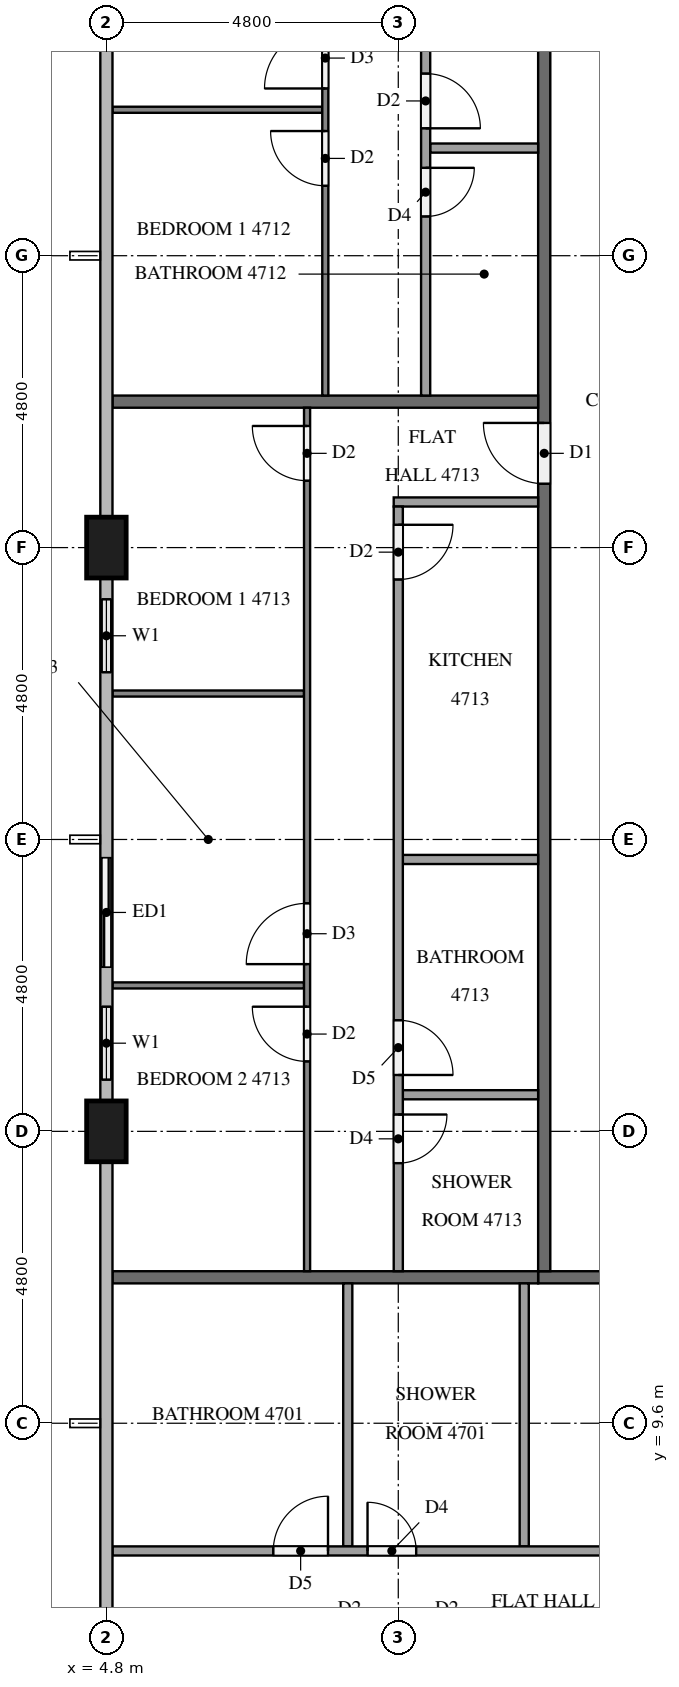
"""IFC4 building model, lengths in metres.
Left out: names, types, materials, properties, quantities, classifications, styles, units other than length and angle.
Written with IfcOpenShell. Run it as: python <this file> out.ifc"""

import sys

from ifc_helpers import new_model, si_unit, direction, frame, frame_2d, origin, origin_2d, place, context, subcontext, project, spatial, rectangle, extrude, element, fill, save


model = new_model("IFC4")
c1 = context("Model", 3, precision=1e-05, world=origin(), true_north=direction((0.0, 1.0)))
c2 = subcontext(c1, "Body", "Model", "MODEL_VIEW")
j1 = project(units=[si_unit("LENGTHUNIT", "METRE"), si_unit("PLANEANGLEUNIT", "RADIAN")], contexts=[c1])
p1 = place(None, origin())
s1 = spatial("IfcSite", under=j1, at=p1, CompositionType="ELEMENT")
p2 = place(p1, origin())
s2 = spatial("IfcBuilding", under=s1, at=p2, CompositionType="ELEMENT")
p3 = place(p2, frame((0.0, 0.0, 182.4)))
s3 = spatial("IfcBuildingStorey", under=s2, at=p3, CompositionType="ELEMENT", Elevation=182.4)
for number, where, z_axis, x_axis in (
    (1, (4.8, 24.0, 0.0), (0.0, 0.0, 1.0), (0.0, 1.0, 0.0)),
    (2, (4.8, 14.4, 0.0), (0.0, 0.0, 1.0), (0.0, 1.0, 0.0)),
):
    element("IfcColumn", number, at=place(p3, frame(where, z_axis=z_axis, x_axis=x_axis)), inside=s3, PredefinedType="COLUMN", context=c2, shape_type="SweptSolid", body=[
        extrude(rectangle(XDim=1.0, YDim=0.65, at=origin_2d()), origin(), (0.0, 0.0, 1.0), 3.2),
    ])
p4 = place(p3, frame((4.8, 23.5, 0.0), z_axis=(0.0, 0.0, 1.0), x_axis=(0.0, -1.0, 0.0)))
e3 = element("IfcWall", 3, at=p4, inside=s3, PredefinedType="SOLIDWALL", context=c2, shape_type="SweptSolid", body=[
    extrude(rectangle(XDim=1.9, YDim=0.15, at=frame_2d((0.95, 0.0))), origin(), (0.0, 0.0, 1.0), 3.2),
])
p5 = place(p4, frame((0.35, 0.0, 0.9)))
e4 = element("IfcOpeningElement", 4, at=p5, cuts=e3, PredefinedType="OPENING", context=c2, shape_type="SweptSolid", body=[
    extrude(rectangle(XDim=1.2, YDim=1.4, at=frame_2d((0.6, 0.7))), frame((0.0, 0.085, 0.0), z_axis=(0.0, -1.0, 0.0), x_axis=(1.0, 0.0, 0.0)), (0.0, 0.0, 1.0), 0.17),
])
p6 = place(p3, frame((4.8, 19.2, 0.0), z_axis=(0.0, 0.0, 1.0), x_axis=(0.0, -1.0, 0.0)))
e5 = element("IfcWall", 5, at=p6, inside=s3, PredefinedType="SOLIDWALL", context=c2, shape_type="SweptSolid", body=[
    extrude(rectangle(XDim=4.3, YDim=0.15, at=frame_2d((2.15, 0.0))), origin(), (0.0, 0.0, 1.0), 3.2),
])
p7 = place(p6, frame((0.3, 0.0, 0.0)))
e6 = element("IfcOpeningElement", 6, at=p7, cuts=e5, PredefinedType="OPENING", context=c2, shape_type="SweptSolid", body=[
    extrude(rectangle(XDim=1.8, YDim=2.4, at=frame_2d((0.9, 1.2))), frame((0.0, 0.085, 0.0), z_axis=(0.0, -1.0, 0.0), x_axis=(1.0, 0.0, 0.0)), (0.0, 0.0, 1.0), 0.17),
])
p8 = place(p6, frame((2.75, 0.0, 0.9)))
e7 = element("IfcOpeningElement", 7, at=p8, cuts=e5, PredefinedType="OPENING", context=c2, shape_type="SweptSolid", body=[
    extrude(rectangle(XDim=1.2, YDim=1.4, at=frame_2d((0.6, 0.7))), frame((0.0, 0.085, 0.0), z_axis=(0.0, -1.0, 0.0), x_axis=(1.0, 0.0, 0.0)), (0.0, 0.0, 1.0), 0.17),
])
p9 = place(p3, frame((50.5, 12.0, 0.0), z_axis=(0.0, 0.0, 1.0), x_axis=(-1.0, 0.0, 0.0)))
e8 = element("IfcWall", 8, at=p9, inside=s3, PredefinedType="PARTITIONING", context=c2, shape_type="SweptSolid", body=[
    extrude(rectangle(XDim=38.6, YDim=0.2, at=frame_2d((19.3, 0.0))), origin(), (0.0, 0.0, 1.0), 3.2),
])
p10 = place(p9, frame((31.65, 0.0, 0.0)))
e9 = element("IfcOpeningElement", 9, at=p10, cuts=e8, PredefinedType="OPENING", context=c2, shape_type="SweptSolid", body=[
    extrude(rectangle(XDim=1.0, YDim=2.1, at=frame_2d((0.5, 1.05))), frame((0.0, 0.11, 0.0), z_axis=(0.0, -1.0, 0.0), x_axis=(1.0, 0.0, 0.0)), (0.0, 0.0, 1.0), 0.22),
])
p11 = place(p9, frame((17.25, 0.0, 0.0)))
e10 = element("IfcOpeningElement", 10, at=p11, cuts=e8, PredefinedType="OPENING", context=c2, shape_type="SweptSolid", body=[
    extrude(rectangle(XDim=1.0, YDim=2.1, at=frame_2d((0.5, 1.05))), frame((0.0, 0.11, 0.0), z_axis=(0.0, -1.0, 0.0), x_axis=(1.0, 0.0, 0.0)), (0.0, 0.0, 1.0), 0.22),
])
p12 = place(p9, frame((7.65, 0.0, 0.0)))
e11 = element("IfcOpeningElement", 11, at=p12, cuts=e8, PredefinedType="OPENING", context=c2, shape_type="SweptSolid", body=[
    extrude(rectangle(XDim=1.0, YDim=2.1, at=frame_2d((0.5, 1.05))), frame((0.0, 0.11, 0.0), z_axis=(0.0, -1.0, 0.0), x_axis=(1.0, 0.0, 0.0)), (0.0, 0.0, 1.0), 0.22),
])
p13 = place(p9, frame((5.9, 0.0, 0.0)))
e12 = element("IfcOpeningElement", 12, at=p13, cuts=e8, PredefinedType="OPENING", context=c2, shape_type="SweptSolid", body=[
    extrude(rectangle(XDim=1.1, YDim=2.1, at=frame_2d((0.55, 1.05))), frame((0.0, 0.11, 0.0), z_axis=(0.0, -1.0, 0.0), x_axis=(1.0, 0.0, 0.0)), (0.0, 0.0, 1.0), 0.22),
])
p14 = place(p3, frame((12.0, 12.1, 0.0), z_axis=(0.0, 0.0, 1.0), x_axis=(0.0, 1.0, 0.0)))
e13 = element("IfcWall", 13, at=p14, inside=s3, PredefinedType="PARTITIONING", context=c2, shape_type="SweptSolid", body=[
    extrude(rectangle(XDim=28.6, YDim=0.2, at=frame_2d((14.3, 0.0))), origin(), (0.0, 0.0, 1.0), 3.2),
])
p15 = place(p14, frame((26.65, 0.0, 0.0)))
e14 = element("IfcOpeningElement", 14, at=p15, cuts=e13, PredefinedType="OPENING", context=c2, shape_type="SweptSolid", body=[
    extrude(rectangle(XDim=1.0, YDim=2.1, at=frame_2d((0.5, 1.05))), frame((0.0, 0.11, 0.0), z_axis=(0.0, -1.0, 0.0), x_axis=(1.0, 0.0, 0.0)), (0.0, 0.0, 1.0), 0.22),
])
p16 = place(p14, frame((24.95, 0.0, 0.0)))
e15 = element("IfcOpeningElement", 15, at=p16, cuts=e13, PredefinedType="OPENING", context=c2, shape_type="SweptSolid", body=[
    extrude(rectangle(XDim=1.0, YDim=2.1, at=frame_2d((0.5, 1.05))), frame((0.0, 0.11, 0.0), z_axis=(0.0, -1.0, 0.0), x_axis=(1.0, 0.0, 0.0)), (0.0, 0.0, 1.0), 0.22),
])
p17 = place(p14, frame((12.95, 0.0, 0.0)))
e16 = element("IfcOpeningElement", 16, at=p17, cuts=e13, PredefinedType="OPENING", context=c2, shape_type="SweptSolid", body=[
    extrude(rectangle(XDim=1.0, YDim=2.1, at=frame_2d((0.5, 1.05))), frame((0.0, 0.11, 0.0), z_axis=(0.0, -1.0, 0.0), x_axis=(1.0, 0.0, 0.0)), (0.0, 0.0, 1.0), 0.22),
])
for number, where, z_axis, x_axis in (
    (17, (4.9, 12.0, 0.0), (0.0, 0.0, 1.0), (1.0, 0.0, 0.0)),
    (18, (4.9, 26.4, 0.0), (0.0, 0.0, 1.0), (1.0, 0.0, 0.0)),
):
    element("IfcWall", number, at=place(p3, frame(where, z_axis=z_axis, x_axis=x_axis)), inside=s3, PredefinedType="PARTITIONING", context=c2, shape_type="SweptSolid", body=[
        extrude(rectangle(XDim=7.0, YDim=0.2, at=frame_2d((3.5, 0.0))), origin(), (0.0, 0.0, 1.0), 3.2),
    ])
for number, where, z_axis, x_axis in (
    (19, (11.671, 11.9, 0.0), (0.0, 0.0, 1.0), (0.0, -1.0, 0.0)),
    (20, (8.769, 11.9, 0.0), (0.0, 0.0, 1.0), (0.0, -1.0, 0.0)),
):
    element("IfcWall", number, at=place(p3, frame(where, z_axis=z_axis, x_axis=x_axis)), inside=s3, PredefinedType="PARTITIONING", context=c2, shape_type="SweptSolid", body=[
        extrude(rectangle(XDim=4.325, YDim=0.15, at=frame_2d((2.163, 0.0))), origin(), (0.0, 0.0, 1.0), 3.2),
    ])
p18 = place(p3, frame((4.9, 7.5, 0.0), z_axis=(0.0, 0.0, 1.0), x_axis=(1.0, 0.0, 0.0)))
e21 = element("IfcWall", 21, at=p18, inside=s3, PredefinedType="PARTITIONING", context=c2, shape_type="SweptSolid", body=[
    extrude(rectangle(XDim=12.575, YDim=0.15, at=frame_2d((6.288, 0.0))), origin(), (0.0, 0.0, 1.0), 3.2),
])
p19 = place(p18, frame((11.375, 0.0, 0.0)))
e22 = element("IfcOpeningElement", 22, at=p19, cuts=e21, PredefinedType="OPENING", context=c2, shape_type="SweptSolid", body=[
    extrude(rectangle(XDim=0.9, YDim=2.1, at=frame_2d((0.45, 1.05))), frame((0.0, 0.085, 0.0), z_axis=(0.0, -1.0, 0.0), x_axis=(1.0, 0.0, 0.0)), (0.0, 0.0, 1.0), 0.17),
])
p20 = place(p18, frame((4.194, 0.0, 0.0)))
e23 = element("IfcOpeningElement", 23, at=p20, cuts=e21, PredefinedType="OPENING", context=c2, shape_type="SweptSolid", body=[
    extrude(rectangle(XDim=0.8, YDim=2.1, at=frame_2d((0.4, 1.05))), frame((0.0, 0.085, 0.0), z_axis=(0.0, -1.0, 0.0), x_axis=(1.0, 0.0, 0.0)), (0.0, 0.0, 1.0), 0.17),
])
p21 = place(p18, frame((2.644, 0.0, 0.0)))
e24 = element("IfcOpeningElement", 24, at=p21, cuts=e21, PredefinedType="OPENING", context=c2, shape_type="SweptSolid", body=[
    extrude(rectangle(XDim=0.9, YDim=2.1, at=frame_2d((0.45, 1.05))), frame((0.0, 0.085, 0.0), z_axis=(0.0, -1.0, 0.0), x_axis=(1.0, 0.0, 0.0)), (0.0, 0.0, 1.0), 0.17),
])
p22 = place(p3, frame((8.35, 31.2, 0.0), z_axis=(0.0, 0.0, 1.0), x_axis=(-1.0, 0.0, 0.0)))
e25 = element("IfcWall", 25, at=p22, inside=s3, PredefinedType="PARTITIONING", context=c2, shape_type="SweptSolid", body=[
    extrude(rectangle(XDim=3.45, YDim=0.1, at=frame_2d((1.725, 0.0))), origin(), (0.0, 0.0, 1.0), 3.2),
])
p23 = place(p3, frame((8.4, 26.5, 0.0), z_axis=(0.0, 0.0, 1.0), x_axis=(0.0, 1.0, 0.0)))
e26 = element("IfcWall", 26, at=p23, inside=s3, PredefinedType="PARTITIONING", context=c2, shape_type="SweptSolid", body=[
    extrude(rectangle(XDim=11.8, YDim=0.1, at=frame_2d((5.9, 0.0))), origin(), (0.0, 0.0, 1.0), 3.2),
])
p24 = place(p23, frame((5.05, 0.0, 0.0)))
e27 = element("IfcOpeningElement", 27, at=p24, cuts=e26, PredefinedType="OPENING", context=c2, shape_type="SweptSolid", body=[
    extrude(rectangle(XDim=1.0, YDim=2.1, at=frame_2d((0.5, 1.05))), frame((0.0, 0.06, 0.0), z_axis=(0.0, -1.0, 0.0), x_axis=(1.0, 0.0, 0.0)), (0.0, 0.0, 1.0), 0.12),
])
p25 = place(p23, frame((3.45, 0.0, 0.0)))
e28 = element("IfcOpeningElement", 28, at=p25, cuts=e26, PredefinedType="OPENING", context=c2, shape_type="SweptSolid", body=[
    extrude(rectangle(XDim=0.9, YDim=2.1, at=frame_2d((0.45, 1.05))), frame((0.0, 0.06, 0.0), z_axis=(0.0, -1.0, 0.0), x_axis=(1.0, 0.0, 0.0)), (0.0, 0.0, 1.0), 0.12),
])
p26 = place(p3, frame((11.9, 30.57, 0.0), z_axis=(0.0, 0.0, 1.0), x_axis=(-1.0, 0.0, 0.0)))
e29 = element("IfcWall", 29, at=p26, inside=s3, PredefinedType="PARTITIONING", context=c2, shape_type="SweptSolid", body=[
    extrude(rectangle(XDim=1.775, YDim=0.15, at=frame_2d((0.887, 0.0))), origin(), (0.0, 0.0, 1.0), 3.2),
])
p27 = place(p3, frame((10.05, 36.675, 0.0), z_axis=(0.0, 0.0, 1.0), x_axis=(0.0, -1.0, 0.0)))
e30 = element("IfcWall", 30, at=p27, inside=s3, PredefinedType="PARTITIONING", context=c2, shape_type="SweptSolid", body=[
    extrude(rectangle(XDim=10.175, YDim=0.15, at=frame_2d((5.087, 0.0))), origin(), (0.0, 0.0, 1.0), 3.2),
])
p28 = place(p27, frame((4.88, 0.0, 0.0)))
e31 = element("IfcOpeningElement", 31, at=p28, cuts=e30, PredefinedType="OPENING", context=c2, shape_type="SweptSolid", body=[
    extrude(rectangle(XDim=0.9, YDim=2.1, at=frame_2d((0.45, 1.05))), frame((0.0, 0.085, 0.0), z_axis=(0.0, -1.0, 0.0), x_axis=(1.0, 0.0, 0.0)), (0.0, 0.0, 1.0), 0.17),
])
p29 = place(p27, frame((6.43, 0.0, 0.0)))
e32 = element("IfcOpeningElement", 32, at=p29, cuts=e30, PredefinedType="OPENING", context=c2, shape_type="SweptSolid", body=[
    extrude(rectangle(XDim=0.8, YDim=2.1, at=frame_2d((0.4, 1.05))), frame((0.0, 0.085, 0.0), z_axis=(0.0, -1.0, 0.0), x_axis=(1.0, 0.0, 0.0)), (0.0, 0.0, 1.0), 0.17),
])
for number, where, z_axis, x_axis in (
    (33, (8.05, 21.6, 0.0), (0.0, 0.0, 1.0), (-1.0, 0.0, 0.0)),
    (34, (8.05, 16.8, 0.0), (0.0, 0.0, 1.0), (-1.0, 0.0, 0.0)),
):
    element("IfcWall", number, at=place(p3, frame(where, z_axis=z_axis, x_axis=x_axis)), inside=s3, PredefinedType="PARTITIONING", context=c2, shape_type="SweptSolid", body=[
        extrude(rectangle(XDim=3.15, YDim=0.1, at=frame_2d((1.575, 0.0))), origin(), (0.0, 0.0, 1.0), 3.2),
    ])
p30 = place(p3, frame((8.1, 12.1, 0.0), z_axis=(0.0, 0.0, 1.0), x_axis=(0.0, 1.0, 0.0)))
e35 = element("IfcWall", 35, at=p30, inside=s3, PredefinedType="PARTITIONING", context=c2, shape_type="SweptSolid", body=[
    extrude(rectangle(XDim=14.2, YDim=0.1, at=frame_2d((7.1, 0.0))), origin(), (0.0, 0.0, 1.0), 3.2),
])
p31 = place(p30, frame((13.0, 0.0, 0.0)))
e36 = element("IfcOpeningElement", 36, at=p31, cuts=e35, PredefinedType="OPENING", context=c2, shape_type="SweptSolid", body=[
    extrude(rectangle(XDim=0.9, YDim=2.1, at=frame_2d((0.45, 1.05))), frame((0.0, 0.06, 0.0), z_axis=(0.0, -1.0, 0.0), x_axis=(1.0, 0.0, 0.0)), (0.0, 0.0, 1.0), 0.12),
])
p32 = place(p30, frame((5.05, 0.0, 0.0)))
e37 = element("IfcOpeningElement", 37, at=p32, cuts=e35, PredefinedType="OPENING", context=c2, shape_type="SweptSolid", body=[
    extrude(rectangle(XDim=1.0, YDim=2.1, at=frame_2d((0.5, 1.05))), frame((0.0, 0.06, 0.0), z_axis=(0.0, -1.0, 0.0), x_axis=(1.0, 0.0, 0.0)), (0.0, 0.0, 1.0), 0.12),
])
p33 = place(p30, frame((3.45, 0.0, 0.0)))
e38 = element("IfcOpeningElement", 38, at=p33, cuts=e35, PredefinedType="OPENING", context=c2, shape_type="SweptSolid", body=[
    extrude(rectangle(XDim=0.9, YDim=2.1, at=frame_2d((0.45, 1.05))), frame((0.0, 0.06, 0.0), z_axis=(0.0, -1.0, 0.0), x_axis=(1.0, 0.0, 0.0)), (0.0, 0.0, 1.0), 0.12),
])
for number, where, z_axis, x_axis in (
    (39, (11.9, 18.871, 0.0), (0.0, 0.0, 1.0), (-1.0, 0.0, 0.0)),
    (40, (11.9, 15.002, 0.0), (0.0, 0.0, 1.0), (-1.0, 0.0, 0.0)),
):
    element("IfcWall", number, at=place(p3, frame(where, z_axis=z_axis, x_axis=x_axis)), inside=s3, PredefinedType="PARTITIONING", context=c2, shape_type="SweptSolid", body=[
        extrude(rectangle(XDim=2.225, YDim=0.15, at=frame_2d((1.112, 0.0))), origin(), (0.0, 0.0, 1.0), 3.2),
    ])
p34 = place(p3, frame((11.9, 24.75, 0.0), z_axis=(0.0, 0.0, 1.0), x_axis=(-1.0, 0.0, 0.0)))
e41 = element("IfcWall", 41, at=p34, inside=s3, PredefinedType="PARTITIONING", context=c2, shape_type="SweptSolid", body=[
    extrude(rectangle(XDim=2.375, YDim=0.15, at=frame_2d((1.188, 0.0))), origin(), (0.0, 0.0, 1.0), 3.2),
])
p35 = place(p3, frame((9.6, 24.675, 0.0), z_axis=(0.0, 0.0, 1.0), x_axis=(0.0, -1.0, 0.0)))
e42 = element("IfcWall", 42, at=p35, inside=s3, PredefinedType="PARTITIONING", context=c2, shape_type="SweptSolid", body=[
    extrude(rectangle(XDim=12.575, YDim=0.15, at=frame_2d((6.288, 0.0))), origin(), (0.0, 0.0, 1.0), 3.2),
])
p36 = place(p35, frame((0.3, 0.0, 0.0)))
e43 = element("IfcOpeningElement", 43, at=p36, cuts=e42, PredefinedType="OPENING", context=c2, shape_type="SweptSolid", body=[
    extrude(rectangle(XDim=0.9, YDim=2.1, at=frame_2d((0.45, 1.05))), frame((0.0, 0.085, 0.0), z_axis=(0.0, -1.0, 0.0), x_axis=(1.0, 0.0, 0.0)), (0.0, 0.0, 1.0), 0.17),
])
p37 = place(p35, frame((8.448, 0.0, 0.0)))
e44 = element("IfcOpeningElement", 44, at=p37, cuts=e42, PredefinedType="OPENING", context=c2, shape_type="SweptSolid", body=[
    extrude(rectangle(XDim=0.9, YDim=2.1, at=frame_2d((0.45, 1.05))), frame((0.0, 0.085, 0.0), z_axis=(0.0, -1.0, 0.0), x_axis=(1.0, 0.0, 0.0)), (0.0, 0.0, 1.0), 0.17),
])
p38 = place(p35, frame((9.998, 0.0, 0.0)))
e45 = element("IfcOpeningElement", 45, at=p38, cuts=e42, PredefinedType="OPENING", context=c2, shape_type="SweptSolid", body=[
    extrude(rectangle(XDim=0.8, YDim=2.1, at=frame_2d((0.4, 1.05))), frame((0.0, 0.085, 0.0), z_axis=(0.0, -1.0, 0.0), x_axis=(1.0, 0.0, 0.0)), (0.0, 0.0, 1.0), 0.17),
])
p39 = place(p5, origin())
e46 = element("IfcWindow", 46, at=p39, inside=s3, PartitioningType="SINGLE_PANEL", PredefinedType="WINDOW", context=c2, shape_type="SweptSolid", body=[
    extrude(rectangle(XDim=1.2, YDim=1.4, at=frame_2d((0.6, 0.7))), frame((0.0, 0.03, 0.0), z_axis=(0.0, -1.0, 0.0), x_axis=(1.0, 0.0, 0.0)), (0.0, 0.0, 1.0), 0.06),
])
fill(e4, e46)
p40 = place(p7, origin())
e47 = element("IfcDoor", 47, at=p40, inside=s3, OperationType="SLIDING_TO_LEFT", PredefinedType="DOOR", context=c2, shape_type="SweptSolid", body=[
    extrude(rectangle(XDim=1.8, YDim=2.4, at=frame_2d((0.9, 1.2))), frame((0.0, 0.025, 0.0), z_axis=(0.0, -1.0, 0.0), x_axis=(1.0, 0.0, 0.0)), (0.0, 0.0, 1.0), 0.05),
])
fill(e6, e47)
p41 = place(p8, origin())
e48 = element("IfcWindow", 48, at=p41, inside=s3, PartitioningType="SINGLE_PANEL", PredefinedType="WINDOW", context=c2, shape_type="SweptSolid", body=[
    extrude(rectangle(XDim=1.2, YDim=1.4, at=frame_2d((0.6, 0.7))), frame((0.0, 0.03, 0.0), z_axis=(0.0, -1.0, 0.0), x_axis=(1.0, 0.0, 0.0)), (0.0, 0.0, 1.0), 0.06),
])
fill(e7, e48)
p42 = place(p17, origin())
e49 = element("IfcDoor", 49, at=p42, inside=s3, OperationType="SINGLE_SWING_RIGHT", PredefinedType="DOOR", context=c2, shape_type="SweptSolid", body=[
    extrude(rectangle(XDim=1.0, YDim=2.1, at=frame_2d((0.5, 1.05))), frame((0.0, 0.025, 0.0), z_axis=(0.0, -1.0, 0.0), x_axis=(1.0, 0.0, 0.0)), (0.0, 0.0, 1.0), 0.05),
])
fill(e16, e49)
p43 = place(p20, origin())
e50 = element("IfcDoor", 50, at=p43, inside=s3, OperationType="SINGLE_SWING_LEFT", PredefinedType="DOOR", context=c2, shape_type="SweptSolid", body=[
    extrude(rectangle(XDim=0.8, YDim=2.1, at=frame_2d((0.4, 1.05))), frame((0.0, 0.025, 0.0), z_axis=(0.0, -1.0, 0.0), x_axis=(1.0, 0.0, 0.0)), (0.0, 0.0, 1.0), 0.05),
])
fill(e23, e50)
p44 = place(p21, origin())
e51 = element("IfcDoor", 51, at=p44, inside=s3, OperationType="SINGLE_SWING_RIGHT", PredefinedType="DOOR", context=c2, shape_type="SweptSolid", body=[
    extrude(rectangle(XDim=0.9, YDim=2.1, at=frame_2d((0.45, 1.05))), frame((0.0, 0.025, 0.0), z_axis=(0.0, -1.0, 0.0), x_axis=(1.0, 0.0, 0.0)), (0.0, 0.0, 1.0), 0.05),
])
fill(e24, e51)
p45 = place(p24, origin())
e52 = element("IfcDoor", 52, at=p45, inside=s3, OperationType="SINGLE_SWING_LEFT", PredefinedType="DOOR", context=c2, shape_type="SweptSolid", body=[
    extrude(rectangle(XDim=1.0, YDim=2.1, at=frame_2d((0.5, 1.05))), frame((0.0, 0.025, 0.0), z_axis=(0.0, -1.0, 0.0), x_axis=(1.0, 0.0, 0.0)), (0.0, 0.0, 1.0), 0.05),
])
fill(e27, e52)
p46 = place(p25, origin())
e53 = element("IfcDoor", 53, at=p46, inside=s3, OperationType="SINGLE_SWING_RIGHT", PredefinedType="DOOR", context=c2, shape_type="SweptSolid", body=[
    extrude(rectangle(XDim=0.9, YDim=2.1, at=frame_2d((0.45, 1.05))), frame((0.0, 0.025, 0.0), z_axis=(0.0, -1.0, 0.0), x_axis=(1.0, 0.0, 0.0)), (0.0, 0.0, 1.0), 0.05),
])
fill(e28, e53)
p47 = place(p28, origin())
e54 = element("IfcDoor", 54, at=p47, inside=s3, OperationType="SINGLE_SWING_RIGHT", PredefinedType="DOOR", context=c2, shape_type="SweptSolid", body=[
    extrude(rectangle(XDim=0.9, YDim=2.1, at=frame_2d((0.45, 1.05))), frame((0.0, 0.025, 0.0), z_axis=(0.0, -1.0, 0.0), x_axis=(1.0, 0.0, 0.0)), (0.0, 0.0, 1.0), 0.05),
])
fill(e31, e54)
p48 = place(p29, origin())
e55 = element("IfcDoor", 55, at=p48, inside=s3, OperationType="SINGLE_SWING_LEFT", PredefinedType="DOOR", context=c2, shape_type="SweptSolid", body=[
    extrude(rectangle(XDim=0.8, YDim=2.1, at=frame_2d((0.4, 1.05))), frame((0.0, 0.025, 0.0), z_axis=(0.0, -1.0, 0.0), x_axis=(1.0, 0.0, 0.0)), (0.0, 0.0, 1.0), 0.05),
])
fill(e32, e55)
p49 = place(p31, origin())
e56 = element("IfcDoor", 56, at=p49, inside=s3, OperationType="SINGLE_SWING_RIGHT", PredefinedType="DOOR", context=c2, shape_type="SweptSolid", body=[
    extrude(rectangle(XDim=0.9, YDim=2.1, at=frame_2d((0.45, 1.05))), frame((0.0, 0.025, 0.0), z_axis=(0.0, -1.0, 0.0), x_axis=(1.0, 0.0, 0.0)), (0.0, 0.0, 1.0), 0.05),
])
fill(e36, e56)
p50 = place(p32, origin())
e57 = element("IfcDoor", 57, at=p50, inside=s3, OperationType="SINGLE_SWING_LEFT", PredefinedType="DOOR", context=c2, shape_type="SweptSolid", body=[
    extrude(rectangle(XDim=1.0, YDim=2.1, at=frame_2d((0.5, 1.05))), frame((0.0, 0.025, 0.0), z_axis=(0.0, -1.0, 0.0), x_axis=(1.0, 0.0, 0.0)), (0.0, 0.0, 1.0), 0.05),
])
fill(e37, e57)
p51 = place(p33, origin())
e58 = element("IfcDoor", 58, at=p51, inside=s3, OperationType="SINGLE_SWING_RIGHT", PredefinedType="DOOR", context=c2, shape_type="SweptSolid", body=[
    extrude(rectangle(XDim=0.9, YDim=2.1, at=frame_2d((0.45, 1.05))), frame((0.0, 0.025, 0.0), z_axis=(0.0, -1.0, 0.0), x_axis=(1.0, 0.0, 0.0)), (0.0, 0.0, 1.0), 0.05),
])
fill(e38, e58)
p52 = place(p36, origin())
e59 = element("IfcDoor", 59, at=p52, inside=s3, OperationType="SINGLE_SWING_LEFT", PredefinedType="DOOR", context=c2, shape_type="SweptSolid", body=[
    extrude(rectangle(XDim=0.9, YDim=2.1, at=frame_2d((0.45, 1.05))), frame((0.0, 0.025, 0.0), z_axis=(0.0, -1.0, 0.0), x_axis=(1.0, 0.0, 0.0)), (0.0, 0.0, 1.0), 0.05),
])
fill(e43, e59)
p53 = place(p37, origin())
e60 = element("IfcDoor", 60, at=p53, inside=s3, OperationType="SINGLE_SWING_RIGHT", PredefinedType="DOOR", context=c2, shape_type="SweptSolid", body=[
    extrude(rectangle(XDim=0.9, YDim=2.1, at=frame_2d((0.45, 1.05))), frame((0.0, 0.025, 0.0), z_axis=(0.0, -1.0, 0.0), x_axis=(1.0, 0.0, 0.0)), (0.0, 0.0, 1.0), 0.05),
])
fill(e44, e60)
p54 = place(p38, origin())
e61 = element("IfcDoor", 61, at=p54, inside=s3, OperationType="SINGLE_SWING_LEFT", PredefinedType="DOOR", context=c2, shape_type="SweptSolid", body=[
    extrude(rectangle(XDim=0.8, YDim=2.1, at=frame_2d((0.4, 1.05))), frame((0.0, 0.025, 0.0), z_axis=(0.0, -1.0, 0.0), x_axis=(1.0, 0.0, 0.0)), (0.0, 0.0, 1.0), 0.05),
])
fill(e45, e61)
save(model, sys.argv[1])
